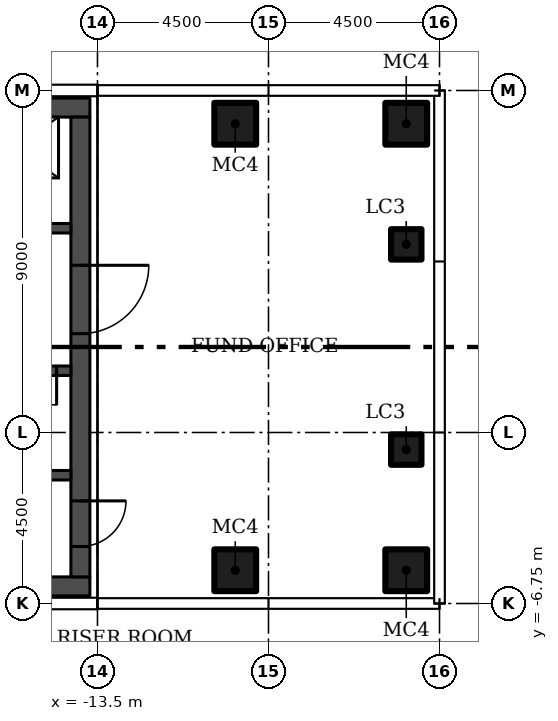
"""IFC4 building model, lengths in metres.
Left out: names, types, materials, properties, quantities, classifications, styles, units other than length and angle.
Written with IfcOpenShell. Run it as: python <this file> out.ifc"""

import sys

from ifc_helpers import new_model, si_unit, direction, frame, frame_2d, origin, origin_2d, place, context, subcontext, project, spatial, rectangle, hollow_rectangle, extrude, element, fill, save


model = new_model("IFC4")
c1 = context("Model", 3, precision=1e-05, world=origin(), true_north=direction((0.0, 1.0)))
c2 = subcontext(c1, "Body", "Model", "MODEL_VIEW")
j1 = project(units=[si_unit("LENGTHUNIT", "METRE"), si_unit("PLANEANGLEUNIT", "RADIAN")], contexts=[c1])
p1 = place(None, origin())
s1 = spatial("IfcSite", under=j1, at=p1, CompositionType="ELEMENT")
p2 = place(p1, origin())
s2 = spatial("IfcBuilding", under=s1, at=p2, CompositionType="ELEMENT")
p3 = place(p2, frame((0.0, 0.0, 162.3)))
s3 = spatial("IfcBuildingStorey", under=s2, at=p3, CompositionType="ELEMENT", Elevation=162.3)
for number, where in (
    (1, (-9.875, -5.875, 0.0)),
    (2, (-5.375, -5.875, 0.0)),
    (3, (-9.875, 5.875, 0.0)),
    (4, (-5.375, 5.875, 0.0)),
):
    element("IfcColumn", number, at=place(p3, frame(where)), inside=s3, PredefinedType="COLUMN", context=c2, shape_type="SweptSolid", body=[
        extrude(hollow_rectangle(XDim=1.1, YDim=1.1, WallThickness=0.04, at=origin_2d()), origin(), (0.0, 0.0, 1.0), 3.55),
    ])
for number, where in (
    (5, (-5.375, -2.7, 0.0)),
    (6, (-5.375, 2.7, 0.0)),
):
    element("IfcColumn", number, at=place(p3, frame(where)), inside=s3, PredefinedType="COLUMN", context=c2, shape_type="SweptSolid", body=[
        extrude(hollow_rectangle(XDim=0.8, YDim=0.8, WallThickness=0.03, at=origin_2d()), origin(), (0.0, 0.0, 1.0), 3.55),
    ])
for number, where in (
    (7, (-26.8, -6.3, 0.0)),
    (8, (-26.8, 6.3, 0.0)),
):
    element("IfcWall", number, at=place(p3, frame(where)), inside=s3, PredefinedType="SHEAR", context=c2, shape_type="SweptSolid", body=[
        extrude(rectangle(XDim=13.1, YDim=0.5, at=frame_2d((6.55, 0.0))), origin(), (0.0, 0.0, 1.0), 3.55),
    ])
p4 = place(p3, frame((-13.95, 6.05, 0.0), z_axis=(0.0, 0.0, 1.0), x_axis=(0.0, -1.0, 0.0)))
e9 = element("IfcWall", 9, at=p4, inside=s3, PredefinedType="SHEAR", context=c2, shape_type="SweptSolid", body=[
    extrude(rectangle(XDim=12.1, YDim=0.5, at=frame_2d((6.05, 0.0))), origin(), (0.0, 0.0, 1.0), 3.55),
])
p5 = place(p4, frame((10.1, 0.0, 0.0)))
e10 = element("IfcOpeningElement", 10, at=p5, cuts=e9, PredefinedType="OPENING", context=c2, shape_type="SweptSolid", body=[
    extrude(rectangle(XDim=1.2, YDim=2.1, at=frame_2d((0.6, 1.05))), frame((0.0, 0.26, 0.0), z_axis=(0.0, -1.0, 0.0), x_axis=(1.0, 0.0, 0.0)), (0.0, 0.0, 1.0), 0.52),
])
p6 = place(p4, frame((3.9, 0.0, 0.0)))
e11 = element("IfcOpeningElement", 11, at=p6, cuts=e9, PredefinedType="OPENING", context=c2, shape_type="SweptSolid", body=[
    extrude(rectangle(XDim=1.8, YDim=2.4, at=frame_2d((0.9, 1.2))), frame((0.0, 0.26, 0.0), z_axis=(0.0, -1.0, 0.0), x_axis=(1.0, 0.0, 0.0)), (0.0, 0.0, 1.0), 0.52),
])
p7 = place(p3, frame((-14.2, -3.375, 0.0), z_axis=(0.0, 0.0, 1.0), x_axis=(-1.0, 0.0, 0.0)))
e12 = element("IfcWall", 12, at=p7, inside=s3, PredefinedType="SHEAR", context=c2, shape_type="SweptSolid", body=[
    extrude(rectangle(XDim=12.1, YDim=0.25, at=frame_2d((6.05, 0.0))), origin(), (0.0, 0.0, 1.0), 3.55),
])
p8 = place(p7, frame((10.95, 0.0, 0.0)))
e13 = element("IfcOpeningElement", 13, at=p8, cuts=e12, PredefinedType="OPENING", context=c2, shape_type="SweptSolid", body=[
    extrude(rectangle(XDim=1.1, YDim=2.1, at=frame_2d((0.55, 1.05))), frame((0.0, 0.135, 0.0), z_axis=(0.0, -1.0, 0.0), x_axis=(1.0, 0.0, 0.0)), (0.0, 0.0, 1.0), 0.27),
])
p9 = place(p3, frame((-14.2, -0.625, 0.0), z_axis=(0.0, 0.0, 1.0), x_axis=(-1.0, 0.0, 0.0)))
e14 = element("IfcWall", 14, at=p9, inside=s3, PredefinedType="SHEAR", context=c2, shape_type="SweptSolid", body=[
    extrude(rectangle(XDim=12.1, YDim=0.25, at=frame_2d((6.05, 0.0))), origin(), (0.0, 0.0, 1.0), 3.55),
])
p10 = place(p9, frame((8.65, 0.0, 0.0)))
e15 = element("IfcOpeningElement", 15, at=p10, cuts=e14, PredefinedType="OPENING", context=c2, shape_type="SweptSolid", body=[
    extrude(rectangle(XDim=1.2, YDim=2.1, at=frame_2d((0.6, 1.05))), frame((0.0, 0.135, 0.0), z_axis=(0.0, -1.0, 0.0), x_axis=(1.0, 0.0, 0.0)), (0.0, 0.0, 1.0), 0.27),
])
p11 = place(p9, frame((2.0, 0.0, 0.0)))
e16 = element("IfcOpeningElement", 16, at=p11, cuts=e14, PredefinedType="OPENING", context=c2, shape_type="SweptSolid", body=[
    extrude(rectangle(XDim=0.9, YDim=2.1, at=frame_2d((0.45, 1.05))), frame((0.0, 0.135, 0.0), z_axis=(0.0, -1.0, 0.0), x_axis=(1.0, 0.0, 0.0)), (0.0, 0.0, 1.0), 0.27),
])
p12 = place(p9, frame((0.375, 0.0, 0.0)))
e17 = element("IfcOpeningElement", 17, at=p12, cuts=e14, PredefinedType="OPENING", context=c2, shape_type="SweptSolid", body=[
    extrude(rectangle(XDim=0.9, YDim=2.1, at=frame_2d((0.45, 1.05))), frame((0.0, 0.135, 0.0), z_axis=(0.0, -1.0, 0.0), x_axis=(1.0, 0.0, 0.0)), (0.0, 0.0, 1.0), 0.27),
])
p13 = place(p3, frame((-26.3, 3.125, 0.0)))
e18 = element("IfcWall", 18, at=p13, inside=s3, PredefinedType="SHEAR", context=c2, shape_type="SweptSolid", body=[
    extrude(rectangle(XDim=12.1, YDim=0.25, at=frame_2d((6.05, 0.0))), origin(), (0.0, 0.0, 1.0), 3.55),
])
p14 = place(p13, frame((6.95, 0.0, 0.0)))
e19 = element("IfcOpeningElement", 19, at=p14, cuts=e18, PredefinedType="OPENING", context=c2, shape_type="SweptSolid", body=[
    extrude(rectangle(XDim=1.1, YDim=2.1, at=frame_2d((0.55, 1.05))), frame((0.0, 0.135, 0.0), z_axis=(0.0, -1.0, 0.0), x_axis=(1.0, 0.0, 0.0)), (0.0, 0.0, 1.0), 0.27),
])
p15 = place(p13, frame((10.075, 0.0, 0.0)))
e20 = element("IfcOpeningElement", 20, at=p15, cuts=e18, PredefinedType="OPENING", context=c2, shape_type="SweptSolid", body=[
    extrude(rectangle(XDim=1.1, YDim=2.1, at=frame_2d((0.55, 1.05))), frame((0.0, 0.135, 0.0), z_axis=(0.0, -1.0, 0.0), x_axis=(1.0, 0.0, 0.0)), (0.0, 0.0, 1.0), 0.27),
])
p16 = place(p13, frame((1.55, 0.0, 0.0)))
e21 = element("IfcOpeningElement", 21, at=p16, cuts=e18, PredefinedType="OPENING", context=c2, shape_type="SweptSolid", body=[
    extrude(rectangle(XDim=0.9, YDim=2.1, at=frame_2d((0.45, 1.05))), frame((0.0, 0.135, 0.0), z_axis=(0.0, -1.0, 0.0), x_axis=(1.0, 0.0, 0.0)), (0.0, 0.0, 1.0), 0.27),
])
p17 = place(p13, frame((4.475, 0.0, 0.0)))
e22 = element("IfcOpeningElement", 22, at=p17, cuts=e18, PredefinedType="OPENING", context=c2, shape_type="SweptSolid", body=[
    extrude(rectangle(XDim=0.9, YDim=2.1, at=frame_2d((0.45, 1.05))), frame((0.0, 0.135, 0.0), z_axis=(0.0, -1.0, 0.0), x_axis=(1.0, 0.0, 0.0)), (0.0, 0.0, 1.0), 0.27),
])
p18 = place(p5, origin())
e23 = element("IfcDoor", 23, at=p18, inside=s3, OperationType="SINGLE_SWING_RIGHT", PredefinedType="DOOR", context=c2, shape_type="SweptSolid", body=[
    extrude(rectangle(XDim=1.2, YDim=2.1, at=frame_2d((0.6, 1.05))), frame((0.0, 0.025, 0.0), z_axis=(0.0, -1.0, 0.0), x_axis=(1.0, 0.0, 0.0)), (0.0, 0.0, 1.0), 0.05),
])
fill(e10, e23)
p19 = place(p6, origin())
e24 = element("IfcDoor", 24, at=p19, inside=s3, OperationType="DOUBLE_DOOR_SINGLE_SWING", PredefinedType="DOOR", context=c2, shape_type="SweptSolid", body=[
    extrude(rectangle(XDim=1.8, YDim=2.4, at=frame_2d((0.9, 1.2))), frame((0.0, 0.025, 0.0), z_axis=(0.0, -1.0, 0.0), x_axis=(1.0, 0.0, 0.0)), (0.0, 0.0, 1.0), 0.05),
])
fill(e11, e24)
p20 = place(p12, origin())
e25 = element("IfcDoor", 25, at=p20, inside=s3, OperationType="SINGLE_SWING_LEFT", PredefinedType="DOOR", context=c2, shape_type="SweptSolid", body=[
    extrude(rectangle(XDim=0.9, YDim=2.1, at=frame_2d((0.45, 1.05))), frame((0.0, 0.025, 0.0), z_axis=(0.0, -1.0, 0.0), x_axis=(1.0, 0.0, 0.0)), (0.0, 0.0, 1.0), 0.05),
])
fill(e17, e25)
save(model, sys.argv[1])
